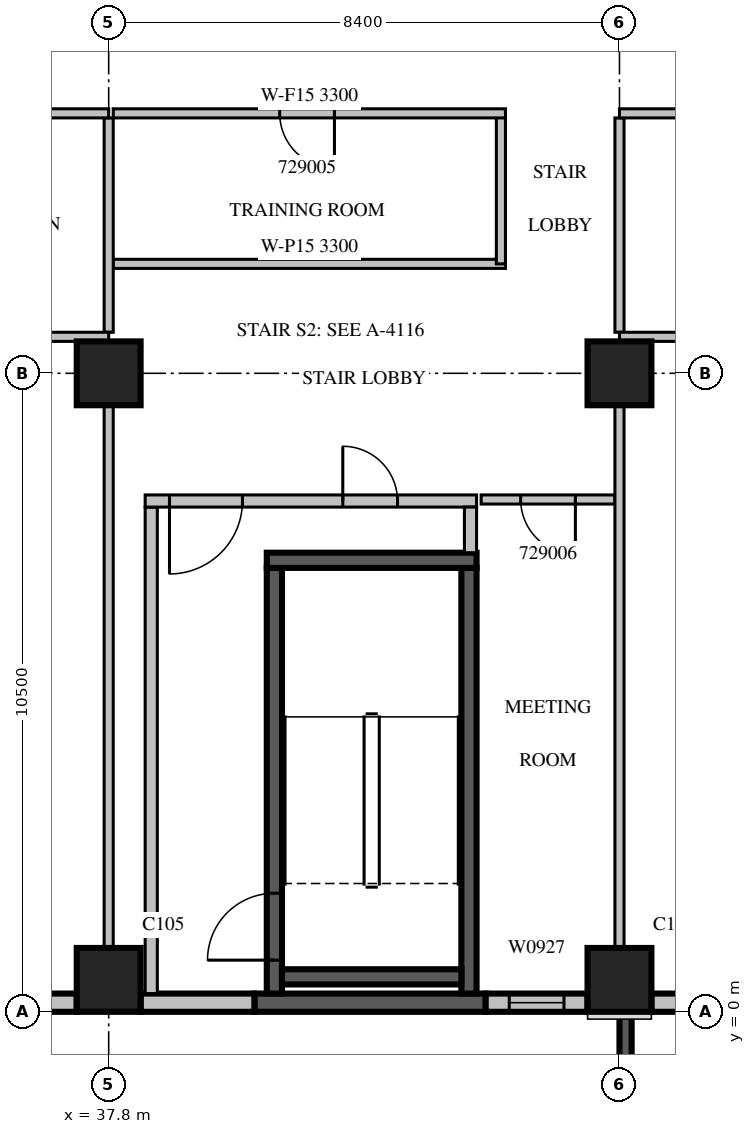
"""IFC4 building model, lengths in metres.
Left out: names, types, materials, properties, quantities, classifications, styles, units other than length and angle.
Written with IfcOpenShell. Run it as: python <this file> out.ifc"""

import sys

from ifc_helpers import new_model, si_unit, direction, frame, frame_2d, origin, origin_2d, place, context, subcontext, project, spatial, rectangle, extrude, source, transform, mapped, element, fill, save


model = new_model("IFC4")
c1 = context("Model", 3, precision=1e-05, world=origin(), true_north=direction((0.0, 1.0)))
c2 = subcontext(c1, "Body", "Model", "MODEL_VIEW")
j1 = project(units=[si_unit("LENGTHUNIT", "METRE"), si_unit("PLANEANGLEUNIT", "RADIAN")], contexts=[c1])
p1 = place(None, origin())
s1 = spatial("IfcSite", under=j1, at=p1, CompositionType="ELEMENT")
p2 = place(p1, origin())
s2 = spatial("IfcBuilding", under=s1, at=p2, CompositionType="ELEMENT")
p3 = place(p2, frame((0.0, 0.0, 132.9)))
s3 = spatial("IfcBuildingStorey", under=s2, at=p3, CompositionType="ELEMENT", Elevation=132.9)
m1 = source(origin(), c2, "Body", "SweptSolid", [
    extrude(rectangle(XDim=1.05, YDim=1.05, at=origin_2d()), origin(), (0.0, 0.0, 1.0), 4.2),
])
for number, where, z_axis, x_axis in (
    (1, (37.8, 0.525, 0.0), (0.0, 0.0, 1.0), (1.0, 0.0, 0.0)),
    (2, (46.2, 0.525, 0.0), (0.0, 0.0, 1.0), (1.0, 0.0, 0.0)),
    (3, (37.8, 10.5, 0.0), (0.0, 0.0, 1.0), (1.0, 0.0, 0.0)),
    (4, (46.2, 10.5, 0.0), (0.0, 0.0, 1.0), (1.0, 0.0, 0.0)),
):
    element("IfcColumn", number, at=place(p3, frame(where, z_axis=z_axis, x_axis=x_axis)), inside=s3, PredefinedType="COLUMN", context=c2, shape_type="MappedRepresentation", body=[
        mapped(m1, transform((0.0, 0.0, 0.0), scale=1.0)),
    ])
m2 = source(origin(), c2, "Body", "SweptSolid", [
    extrude(rectangle(XDim=7.35, YDim=0.3, at=frame_2d((3.675, 0.0))), origin(), (0.0, 0.0, 1.0), 3.8),
])
p4 = place(p3, frame((29.925, 0.15, 0.0), z_axis=(0.0, 0.0, 1.0), x_axis=(1.0, 0.0, 0.0)))
e5 = element("IfcWall", 5, at=p4, inside=s3, PredefinedType="STANDARD", context=c2, shape_type="MappedRepresentation", body=[
    mapped(m2, transform((0.0, 0.0, 0.0), scale=1.0)),
])
m3 = source(origin(), c2, "Body", "SweptSolid", [
    extrude(rectangle(XDim=2.4, YDim=2.7, at=frame_2d((1.2, 1.35))), frame((0.0, 0.16, 0.0), z_axis=(0.0, -1.0, 0.0), x_axis=(1.0, 0.0, 0.0)), (0.0, 0.0, 1.0), 0.32),
])
p5 = place(p4, frame((2.575, 0.0, 0.6)))
e6 = element("IfcOpeningElement", 6, at=p5, cuts=e5, PredefinedType="OPENING", context=c2, shape_type="MappedRepresentation", body=[
    mapped(m3, transform((0.0, 0.0, 0.0), scale=1.0)),
])
m4 = source(origin(), c2, "Body", "SweptSolid", [
    extrude(rectangle(XDim=1.875, YDim=0.3, at=frame_2d((0.938, 0.0))), origin(), (0.0, 0.0, 1.0), 3.8),
])
p6 = place(p3, frame((38.325, 0.15, 0.0), z_axis=(0.0, 0.0, 1.0), x_axis=(1.0, 0.0, 0.0)))
e7 = element("IfcWall", 7, at=p6, inside=s3, PredefinedType="STANDARD", context=c2, shape_type="MappedRepresentation", body=[
    mapped(m4, transform((0.0, 0.0, 0.0), scale=1.0)),
])
m5 = source(origin(), c2, "Body", "SweptSolid", [
    extrude(rectangle(XDim=3.8, YDim=0.3, at=frame_2d((1.9, 0.0))), origin(), (0.0, 0.0, 1.0), 3.8),
])
p7 = place(p3, frame((40.2, 0.15, 0.0), z_axis=(0.0, 0.0, 1.0), x_axis=(1.0, 0.0, 0.0)))
e8 = element("IfcWall", 8, at=p7, inside=s3, PredefinedType="SOLIDWALL", context=c2, shape_type="MappedRepresentation", body=[
    mapped(m5, transform((0.0, 0.0, 0.0), scale=1.0)),
])
m6 = source(origin(), c2, "Body", "SweptSolid", [
    extrude(rectangle(XDim=1.675, YDim=0.3, at=frame_2d((0.838, 0.0))), origin(), (0.0, 0.0, 1.0), 3.8),
])
p8 = place(p3, frame((44.0, 0.15, 0.0), z_axis=(0.0, 0.0, 1.0), x_axis=(1.0, 0.0, 0.0)))
e9 = element("IfcWall", 9, at=p8, inside=s3, PredefinedType="STANDARD", context=c2, shape_type="MappedRepresentation", body=[
    mapped(m6, transform((0.0, 0.0, 0.0), scale=1.0)),
])
m7 = source(origin(), c2, "Body", "SweptSolid", [
    extrude(rectangle(XDim=0.9, YDim=2.7, at=frame_2d((0.45, 1.35))), frame((0.0, 0.16, 0.0), z_axis=(0.0, -1.0, 0.0), x_axis=(1.0, 0.0, 0.0)), (0.0, 0.0, 1.0), 0.32),
])
p9 = place(p8, frame((0.388, 0.0, 0.6)))
e10 = element("IfcOpeningElement", 10, at=p9, cuts=e9, PredefinedType="OPENING", context=c2, shape_type="MappedRepresentation", body=[
    mapped(m7, transform((0.0, 0.0, 0.0), scale=1.0)),
])
m8 = source(origin(), c2, "Body", "SweptSolid", [
    extrude(rectangle(XDim=4.83, YDim=0.3, at=frame_2d((2.415, 0.0))), origin(), (0.0, 0.0, 1.0), 3.8),
])
p10 = place(p3, frame((46.725, 0.15, 0.0), z_axis=(0.0, 0.0, 1.0), x_axis=(1.0, 0.0, 0.0)))
e11 = element("IfcWall", 11, at=p10, inside=s3, PredefinedType="STANDARD", context=c2, shape_type="MappedRepresentation", body=[
    mapped(m8, transform((0.0, 0.0, 0.0), scale=1.0)),
])
m9 = source(origin(), c2, "Body", "SweptSolid", [
    extrude(rectangle(XDim=1.0, YDim=2.1, at=frame_2d((0.5, 1.05))), frame((0.0, 0.16, 0.0), z_axis=(0.0, -1.0, 0.0), x_axis=(1.0, 0.0, 0.0)), (0.0, 0.0, 1.0), 0.32),
])
p11 = place(p10, frame((1.915, 0.0, 0.0)))
e12 = element("IfcOpeningElement", 12, at=p11, cuts=e11, PredefinedType="OPENING", context=c2, shape_type="MappedRepresentation", body=[
    mapped(m9, transform((0.0, 0.0, 0.0), scale=1.0)),
])
m10 = source(origin(), c2, "Body", "SweptSolid", [
    extrude(rectangle(XDim=3.9, YDim=0.2, at=frame_2d((1.95, 0.0))), origin(), (0.0, 0.0, 1.0), 3.79),
])
p12 = place(p3, frame((46.3, 0.0, 0.0), z_axis=(0.0, 0.0, 1.0), x_axis=(0.0, -1.0, 0.0)))
e13 = element("IfcWall", 13, at=p12, inside=s3, PredefinedType="SOLIDWALL", context=c2, shape_type="MappedRepresentation", body=[
    mapped(m10, transform((0.0, 0.0, 0.0), scale=1.0)),
])
m11 = source(origin(), c2, "Body", "SweptSolid", [
    extrude(rectangle(XDim=2.4, YDim=2.7, at=frame_2d((1.2, 1.35))), frame((0.0, 0.11, 0.0), z_axis=(0.0, -1.0, 0.0), x_axis=(1.0, 0.0, 0.0)), (0.0, 0.0, 1.0), 0.22),
])
p13 = place(p12, frame((0.75, 0.0, 0.6)))
e14 = element("IfcOpeningElement", 14, at=p13, cuts=e13, PredefinedType="OPENING", context=c2, shape_type="MappedRepresentation", body=[
    mapped(m11, transform((0.0, 0.0, 0.0), scale=1.0)),
])
m12 = source(origin(), c2, "Body", "SweptSolid", [
    extrude(rectangle(XDim=7.0, YDim=0.25, at=frame_2d((3.5, 0.0))), origin(), (0.0, 0.0, 1.0), 3.8),
])
p14 = place(p3, frame((40.525, 0.3, 0.0), z_axis=(0.0, 0.0, 1.0), x_axis=(0.0, 1.0, 0.0)))
e15 = element("IfcWall", 15, at=p14, inside=s3, PredefinedType="SOLIDWALL", context=c2, shape_type="MappedRepresentation", body=[
    mapped(m12, transform((0.0, 0.0, 0.0), scale=1.0)),
])
m13 = source(origin(), c2, "Body", "SweptSolid", [
    extrude(rectangle(XDim=1.1, YDim=2.1, at=frame_2d((0.55, 1.05))), frame((0.0, 0.135, 0.0), z_axis=(0.0, -1.0, 0.0), x_axis=(1.0, 0.0, 0.0)), (0.0, 0.0, 1.0), 0.27),
])
p15 = place(p14, frame((0.55, 0.0, 0.0)))
e16 = element("IfcOpeningElement", 16, at=p15, cuts=e15, PredefinedType="OPENING", context=c2, shape_type="MappedRepresentation", body=[
    mapped(m13, transform((0.0, 0.0, 0.0), scale=1.0)),
])
p16 = place(p3, frame((43.725, 0.3, 0.0), z_axis=(0.0, 0.0, 1.0), x_axis=(0.0, 1.0, 0.0)))
e17 = element("IfcWall", 17, at=p16, inside=s3, PredefinedType="SOLIDWALL", context=c2, shape_type="MappedRepresentation", body=[
    mapped(m12, transform((0.0, 0.0, 0.0), scale=1.0)),
])
m14 = source(origin(), c2, "Body", "SweptSolid", [
    extrude(rectangle(XDim=3.45, YDim=0.25, at=frame_2d((1.725, 0.0))), origin(), (0.0, 0.0, 1.0), 3.8),
])
p17 = place(p3, frame((40.4, 7.425, 0.0), z_axis=(0.0, 0.0, 1.0), x_axis=(1.0, 0.0, 0.0)))
e18 = element("IfcWall", 18, at=p17, inside=s3, PredefinedType="SOLIDWALL", context=c2, shape_type="MappedRepresentation", body=[
    mapped(m14, transform((0.0, 0.0, 0.0), scale=1.0)),
])
m15 = source(origin(), c2, "Body", "SweptSolid", [
    extrude(rectangle(XDim=2.95, YDim=0.25, at=frame_2d((1.475, 0.0))), origin(), (0.0, 0.0, 1.0), 3.8),
])
p18 = place(p3, frame((40.65, 0.575, 0.0), z_axis=(0.0, 0.0, 1.0), x_axis=(1.0, 0.0, 0.0)))
e19 = element("IfcWall", 19, at=p18, inside=s3, PredefinedType="SOLIDWALL", context=c2, shape_type="MappedRepresentation", body=[
    mapped(m15, transform((0.0, 0.0, 0.0), scale=1.0)),
])
m16 = source(origin(), c2, "Body", "SweptSolid", [
    extrude(rectangle(XDim=8.0, YDim=0.2, at=frame_2d((4.0, 0.0))), origin(), (0.0, 0.0, 1.0), 3.8),
])
p19 = place(p3, frame((38.5, 0.3, 0.0), z_axis=(0.0, 0.0, 1.0), x_axis=(0.0, 1.0, 0.0)))
e20 = element("IfcWall", 20, at=p19, inside=s3, PredefinedType="PARTITIONING", context=c2, shape_type="MappedRepresentation", body=[
    mapped(m16, transform((0.0, 0.0, 0.0), scale=1.0)),
])
m17 = source(origin(), c2, "Body", "SweptSolid", [
    extrude(rectangle(XDim=5.45, YDim=0.2, at=frame_2d((2.725, 0.0))), origin(), (0.0, 0.0, 1.0), 3.8),
])
p20 = place(p3, frame((38.4, 8.4, 0.0), z_axis=(0.0, 0.0, 1.0), x_axis=(1.0, 0.0, 0.0)))
e21 = element("IfcWall", 21, at=p20, inside=s3, PredefinedType="PARTITIONING", context=c2, shape_type="MappedRepresentation", body=[
    mapped(m17, transform((0.0, 0.0, 0.0), scale=1.0)),
])
m18 = source(origin(), c2, "Body", "SweptSolid", [
    extrude(rectangle(XDim=1.2, YDim=2.1, at=frame_2d((0.6, 1.05))), frame((0.0, 0.11, 0.0), z_axis=(0.0, -1.0, 0.0), x_axis=(1.0, 0.0, 0.0)), (0.0, 0.0, 1.0), 0.22),
])
p21 = place(p20, frame((0.4, 0.0, 0.0)))
e22 = element("IfcOpeningElement", 22, at=p21, cuts=e21, PredefinedType="OPENING", context=c2, shape_type="MappedRepresentation", body=[
    mapped(m18, transform((0.0, 0.0, 0.0), scale=1.0)),
])
m19 = source(origin(), c2, "Body", "SweptSolid", [
    extrude(rectangle(XDim=0.9, YDim=2.1, at=frame_2d((0.45, 1.05))), frame((0.0, 0.11, 0.0), z_axis=(0.0, -1.0, 0.0), x_axis=(1.0, 0.0, 0.0)), (0.0, 0.0, 1.0), 0.22),
])
p22 = place(p20, frame((3.25, 0.0, 0.0)))
e23 = element("IfcOpeningElement", 23, at=p22, cuts=e21, PredefinedType="OPENING", context=c2, shape_type="MappedRepresentation", body=[
    mapped(m19, transform((0.0, 0.0, 0.0), scale=1.0)),
])
m20 = source(origin(), c2, "Body", "SweptSolid", [
    extrude(rectangle(XDim=0.75, YDim=0.2, at=frame_2d((0.375, 0.0))), origin(), (0.0, 0.0, 1.0), 3.8),
])
p23 = place(p3, frame((43.75, 7.55, 0.0), z_axis=(0.0, 0.0, 1.0), x_axis=(0.0, 1.0, 0.0)))
e24 = element("IfcWall", 24, at=p23, inside=s3, PredefinedType="PARTITIONING", context=c2, shape_type="MappedRepresentation", body=[
    mapped(m20, transform((0.0, 0.0, 0.0), scale=1.0)),
])
m21 = source(origin(), c2, "Body", "SweptSolid", [
    extrude(rectangle(XDim=6.45, YDim=0.15, at=frame_2d((3.225, 0.0))), origin(), (0.0, 0.0, 1.0), 3.3),
])
p24 = place(p3, frame((37.875, 12.3, 0.0), z_axis=(0.0, 0.0, 1.0), x_axis=(1.0, 0.0, 0.0)))
e25 = element("IfcWall", 25, at=p24, inside=s3, PredefinedType="PARTITIONING", context=c2, shape_type="MappedRepresentation", body=[
    mapped(m21, transform((0.0, 0.0, 0.0), scale=1.0)),
])
m22 = source(origin(), c2, "Body", "SweptSolid", [
    extrude(rectangle(XDim=2.475, YDim=0.15, at=frame_2d((1.238, 0.0))), origin(), (0.0, 0.0, 1.0), 3.8),
])
p25 = place(p3, frame((44.25, 12.3, 0.0), z_axis=(0.0, 0.0, 1.0), x_axis=(0.0, 1.0, 0.0)))
e26 = element("IfcWall", 26, at=p25, inside=s3, PredefinedType="PARTITIONING", context=c2, shape_type="MappedRepresentation", body=[
    mapped(m22, transform((0.0, 0.0, 0.0), scale=1.0)),
])
p26 = place(p3, frame((44.325, 14.775, 0.0), z_axis=(0.0, 0.0, 1.0), x_axis=(-1.0, 0.0, 0.0)))
e27 = element("IfcWall", 27, at=p26, inside=s3, PredefinedType="PARTITIONING", context=c2, shape_type="MappedRepresentation", body=[
    mapped(m21, transform((0.0, 0.0, 0.0), scale=1.0)),
])
m23 = source(origin(), c2, "Body", "SweptSolid", [
    extrude(rectangle(XDim=0.9, YDim=2.1, at=frame_2d((0.45, 1.05))), frame((0.0, 0.085, 0.0), z_axis=(0.0, -1.0, 0.0), x_axis=(1.0, 0.0, 0.0)), (0.0, 0.0, 1.0), 0.17),
])
p27 = place(p26, frame((2.812, 0.0, 0.0)))
e28 = element("IfcOpeningElement", 28, at=p27, cuts=e27, PredefinedType="OPENING", context=c2, shape_type="MappedRepresentation", body=[
    mapped(m23, transform((0.0, 0.0, 0.0), scale=1.0)),
])
m24 = source(origin(), c2, "Body", "SweptSolid", [
    extrude(rectangle(XDim=2.2, YDim=0.15, at=frame_2d((1.1, 0.0))), origin(), (0.0, 0.0, 1.0), 3.8),
])
p28 = place(p3, frame((46.125, 8.425, 0.0), z_axis=(0.0, 0.0, 1.0), x_axis=(-1.0, 0.0, 0.0)))
e29 = element("IfcWall", 29, at=p28, inside=s3, PredefinedType="PARTITIONING", context=c2, shape_type="MappedRepresentation", body=[
    mapped(m24, transform((0.0, 0.0, 0.0), scale=1.0)),
])
p29 = place(p28, frame((0.65, 0.0, 0.0)))
e30 = element("IfcOpeningElement", 30, at=p29, cuts=e29, PredefinedType="OPENING", context=c2, shape_type="MappedRepresentation", body=[
    mapped(m23, transform((0.0, 0.0, 0.0), scale=1.0)),
])
m25 = source(origin(), c2, "Body", "SweptSolid", [
    extrude(rectangle(XDim=8.927, YDim=0.15, at=frame_2d((4.463, 0.0))), origin(), (0.0, 0.0, 1.0), 3.8),
])
p30 = place(p3, frame((37.8, 1.049, 0.0), z_axis=(0.0, 0.0, 1.0), x_axis=(0.0, 1.0, 0.0)))
e31 = element("IfcWall", 31, at=p30, inside=s3, PredefinedType="PARTITIONING", context=c2, shape_type="MappedRepresentation", body=[
    mapped(m25, transform((0.0, 0.0, 0.0), scale=1.0)),
])
m26 = source(origin(), c2, "Body", "SweptSolid", [
    extrude(rectangle(XDim=3.525, YDim=0.15, at=frame_2d((1.762, 0.0))), origin(), (0.0, 0.0, 1.0), 3.8),
])
p31 = place(p3, frame((37.8, 11.175, 0.0), z_axis=(0.0, 0.0, 1.0), x_axis=(0.0, 1.0, 0.0)))
e32 = element("IfcWall", 32, at=p31, inside=s3, PredefinedType="PARTITIONING", context=c2, shape_type="MappedRepresentation", body=[
    mapped(m26, transform((0.0, 0.0, 0.0), scale=1.0)),
])
m27 = source(origin(), c2, "Body", "SweptSolid", [
    extrude(rectangle(XDim=8.4, YDim=0.15, at=frame_2d((4.2, 0.0))), origin(), (0.0, 0.0, 1.0), 3.3),
])
p32 = place(p3, frame((37.8, 11.1, 0.0), z_axis=(0.0, 0.0, 1.0), x_axis=(-1.0, 0.0, 0.0)))
e33 = element("IfcWall", 33, at=p32, inside=s3, PredefinedType="PARTITIONING", context=c2, shape_type="MappedRepresentation", body=[
    mapped(m27, transform((0.0, 0.0, 0.0), scale=1.0)),
])
m28 = source(origin(), c2, "Body", "SweptSolid", [
    extrude(rectangle(XDim=1.1, YDim=2.1, at=frame_2d((0.55, 1.05))), frame((0.0, 0.085, 0.0), z_axis=(0.0, -1.0, 0.0), x_axis=(1.0, 0.0, 0.0)), (0.0, 0.0, 1.0), 0.17),
])
p33 = place(p32, frame((1.345, 0.0, 0.0)))
e34 = element("IfcOpeningElement", 34, at=p33, cuts=e33, PredefinedType="OPENING", context=c2, shape_type="MappedRepresentation", body=[
    mapped(m28, transform((0.0, 0.0, 0.0), scale=1.0)),
])
p34 = place(p3, frame((46.2, 1.049, 0.0), z_axis=(0.0, 0.0, 1.0), x_axis=(0.0, 1.0, 0.0)))
e35 = element("IfcWall", 35, at=p34, inside=s3, PredefinedType="PARTITIONING", context=c2, shape_type="MappedRepresentation", body=[
    mapped(m25, transform((0.0, 0.0, 0.0), scale=1.0)),
])
p35 = place(p3, frame((46.2, 11.175, 0.0), z_axis=(0.0, 0.0, 1.0), x_axis=(0.0, 1.0, 0.0)))
e36 = element("IfcWall", 36, at=p35, inside=s3, PredefinedType="PARTITIONING", context=c2, shape_type="MappedRepresentation", body=[
    mapped(m26, transform((0.0, 0.0, 0.0), scale=1.0)),
])
m29 = source(origin(), c2, "Body", "SweptSolid", [
    extrude(rectangle(XDim=24.9, YDim=0.15, at=frame_2d((12.45, 0.0))), origin(), (0.0, 0.0, 1.0), 3.8),
])
p36 = place(p3, frame((71.1, 11.1, 0.0), z_axis=(0.0, 0.0, 1.0), x_axis=(-1.0, 0.0, 0.0)))
e37 = element("IfcWall", 37, at=p36, inside=s3, PredefinedType="PARTITIONING", context=c2, shape_type="MappedRepresentation", body=[
    mapped(m29, transform((0.0, 0.0, 0.0), scale=1.0)),
])
p37 = place(p36, frame((19.988, 0.0, 0.0)))
e38 = element("IfcOpeningElement", 38, at=p37, cuts=e37, PredefinedType="OPENING", context=c2, shape_type="MappedRepresentation", body=[
    mapped(m28, transform((0.0, 0.0, 0.0), scale=1.0)),
])
p38 = place(p36, frame((16.497, 0.0, 0.0)))
e39 = element("IfcOpeningElement", 39, at=p38, cuts=e37, PredefinedType="OPENING", context=c2, shape_type="MappedRepresentation", body=[
    mapped(m28, transform((0.0, 0.0, 0.0), scale=1.0)),
])
p39 = place(p36, frame((2.028, 0.0, 0.0)))
e40 = element("IfcOpeningElement", 40, at=p39, cuts=e37, PredefinedType="OPENING", context=c2, shape_type="MappedRepresentation", body=[
    mapped(m23, transform((0.0, 0.0, 0.0), scale=1.0)),
])
p40 = place(p3, frame((37.8, 14.775, 0.0), z_axis=(0.0, 0.0, 1.0), x_axis=(-1.0, 0.0, 0.0)))
e41 = element("IfcWall", 41, at=p40, inside=s3, PredefinedType="PARTITIONING", context=c2, shape_type="MappedRepresentation", body=[
    mapped(m27, transform((0.0, 0.0, 0.0), scale=1.0)),
])
p41 = place(p40, frame((1.12, 0.0, 0.0)))
e42 = element("IfcOpeningElement", 42, at=p41, cuts=e41, PredefinedType="OPENING", context=c2, shape_type="MappedRepresentation", body=[
    mapped(m28, transform((0.0, 0.0, 0.0), scale=1.0)),
])
p42 = place(p40, frame((6.744, 0.0, 0.0)))
e43 = element("IfcOpeningElement", 43, at=p42, cuts=e41, PredefinedType="OPENING", context=c2, shape_type="MappedRepresentation", body=[
    mapped(m23, transform((0.0, 0.0, 0.0), scale=1.0)),
])
p43 = place(p40, frame((4.214, 0.0, 0.0)))
e44 = element("IfcOpeningElement", 44, at=p43, cuts=e41, PredefinedType="OPENING", context=c2, shape_type="MappedRepresentation", body=[
    mapped(m23, transform((0.0, 0.0, 0.0), scale=1.0)),
])
p44 = place(p3, frame((71.1, 14.775, 0.0), z_axis=(0.0, 0.0, 1.0), x_axis=(-1.0, 0.0, 0.0)))
e45 = element("IfcWall", 45, at=p44, inside=s3, PredefinedType="PARTITIONING", context=c2, shape_type="MappedRepresentation", body=[
    mapped(m29, transform((0.0, 0.0, 0.0), scale=1.0)),
])
p45 = place(p44, frame((19.754, 0.0, 0.0)))
e46 = element("IfcOpeningElement", 46, at=p45, cuts=e45, PredefinedType="OPENING", context=c2, shape_type="MappedRepresentation", body=[
    mapped(m28, transform((0.0, 0.0, 0.0), scale=1.0)),
])
p46 = place(p44, frame((22.794, 0.0, 0.0)))
e47 = element("IfcOpeningElement", 47, at=p46, cuts=e45, PredefinedType="OPENING", context=c2, shape_type="MappedRepresentation", body=[
    mapped(m23, transform((0.0, 0.0, 0.0), scale=1.0)),
])
p47 = place(p44, frame((16.772, 0.0, 0.0)))
e48 = element("IfcOpeningElement", 48, at=p47, cuts=e45, PredefinedType="OPENING", context=c2, shape_type="MappedRepresentation", body=[
    mapped(m28, transform((0.0, 0.0, 0.0), scale=1.0)),
])
p48 = place(p44, frame((13.886, 0.0, 0.0)))
e49 = element("IfcOpeningElement", 49, at=p48, cuts=e45, PredefinedType="OPENING", context=c2, shape_type="MappedRepresentation", body=[
    mapped(m23, transform((0.0, 0.0, 0.0), scale=1.0)),
])
p49 = place(p44, frame((11.382, 0.0, 0.0)))
e50 = element("IfcOpeningElement", 50, at=p49, cuts=e45, PredefinedType="OPENING", context=c2, shape_type="MappedRepresentation", body=[
    mapped(m23, transform((0.0, 0.0, 0.0), scale=1.0)),
])
p50 = place(p44, frame((9.2, 0.0, 0.0)))
e51 = element("IfcOpeningElement", 51, at=p50, cuts=e45, PredefinedType="OPENING", context=c2, shape_type="MappedRepresentation", body=[
    mapped(m23, transform((0.0, 0.0, 0.0), scale=1.0)),
])
p51 = place(p44, frame((7.522, 0.0, 0.0)))
e52 = element("IfcOpeningElement", 52, at=p51, cuts=e45, PredefinedType="OPENING", context=c2, shape_type="MappedRepresentation", body=[
    mapped(m23, transform((0.0, 0.0, 0.0), scale=1.0)),
])
p52 = place(p44, frame((0.976, 0.0, 0.0)))
e53 = element("IfcOpeningElement", 53, at=p52, cuts=e45, PredefinedType="OPENING", context=c2, shape_type="MappedRepresentation", body=[
    mapped(m28, transform((0.0, 0.0, 0.0), scale=1.0)),
])
p53 = place(p44, frame((4.743, 0.0, 0.0)))
e54 = element("IfcOpeningElement", 54, at=p53, cuts=e45, PredefinedType="OPENING", context=c2, shape_type="MappedRepresentation", body=[
    mapped(m23, transform((0.0, 0.0, 0.0), scale=1.0)),
])
m30 = source(origin(), c2, "Body", "SweptSolid", [
    extrude(rectangle(XDim=0.9, YDim=2.7, at=frame_2d((0.45, 1.35))), frame((0.0, 0.03, 0.0), z_axis=(0.0, -1.0, 0.0), x_axis=(1.0, 0.0, 0.0)), (0.0, 0.0, 1.0), 0.06),
])
p54 = place(p9, origin())
e55 = element("IfcWindow", 55, at=p54, inside=s3, PartitioningType="SINGLE_PANEL", PredefinedType="WINDOW", context=c2, shape_type="MappedRepresentation", body=[
    mapped(m30, transform((0.0, 0.0, 0.0), scale=1.0)),
])
fill(e10, e55)
m31 = source(origin(), c2, "Body", "SweptSolid", [
    extrude(rectangle(XDim=1.1, YDim=2.1, at=frame_2d((0.55, 1.05))), frame((0.0, 0.025, 0.0), z_axis=(0.0, -1.0, 0.0), x_axis=(1.0, 0.0, 0.0)), (0.0, 0.0, 1.0), 0.05),
])
p55 = place(p15, origin())
e56 = element("IfcDoor", 56, at=p55, inside=s3, OperationType="SINGLE_SWING_LEFT", PredefinedType="DOOR", context=c2, shape_type="MappedRepresentation", body=[
    mapped(m31, transform((0.0, 0.0, 0.0), scale=1.0)),
])
fill(e16, e56)
m32 = source(origin(), c2, "Body", "SweptSolid", [
    extrude(rectangle(XDim=1.2, YDim=2.1, at=frame_2d((0.6, 1.05))), frame((0.0, 0.025, 0.0), z_axis=(0.0, -1.0, 0.0), x_axis=(1.0, 0.0, 0.0)), (0.0, 0.0, 1.0), 0.05),
])
p56 = place(p21, origin())
e57 = element("IfcDoor", 57, at=p56, inside=s3, OperationType="SINGLE_SWING_RIGHT", PredefinedType="DOOR", context=c2, shape_type="MappedRepresentation", body=[
    mapped(m32, transform((0.0, 0.0, 0.0), scale=1.0)),
])
fill(e22, e57)
m33 = source(origin(), c2, "Body", "SweptSolid", [
    extrude(rectangle(XDim=0.9, YDim=2.1, at=frame_2d((0.45, 1.05))), frame((0.0, 0.025, 0.0), z_axis=(0.0, -1.0, 0.0), x_axis=(1.0, 0.0, 0.0)), (0.0, 0.0, 1.0), 0.05),
])
p57 = place(p22, origin())
e58 = element("IfcDoor", 58, at=p57, inside=s3, OperationType="SINGLE_SWING_LEFT", PredefinedType="DOOR", context=c2, shape_type="MappedRepresentation", body=[
    mapped(m33, transform((0.0, 0.0, 0.0), scale=1.0)),
])
fill(e23, e58)
p58 = place(p27, origin())
e59 = element("IfcDoor", 59, at=p58, inside=s3, OperationType="SINGLE_SWING_LEFT", PredefinedType="DOOR", context=c2, shape_type="MappedRepresentation", body=[
    mapped(m33, transform((0.0, 0.0, 0.0), scale=1.0)),
])
fill(e28, e59)
p59 = place(p29, origin())
e60 = element("IfcDoor", 60, at=p59, inside=s3, OperationType="SINGLE_SWING_LEFT", PredefinedType="DOOR", context=c2, shape_type="MappedRepresentation", body=[
    mapped(m33, transform((0.0, 0.0, 0.0), scale=1.0)),
])
fill(e30, e60)
save(model, sys.argv[1])
